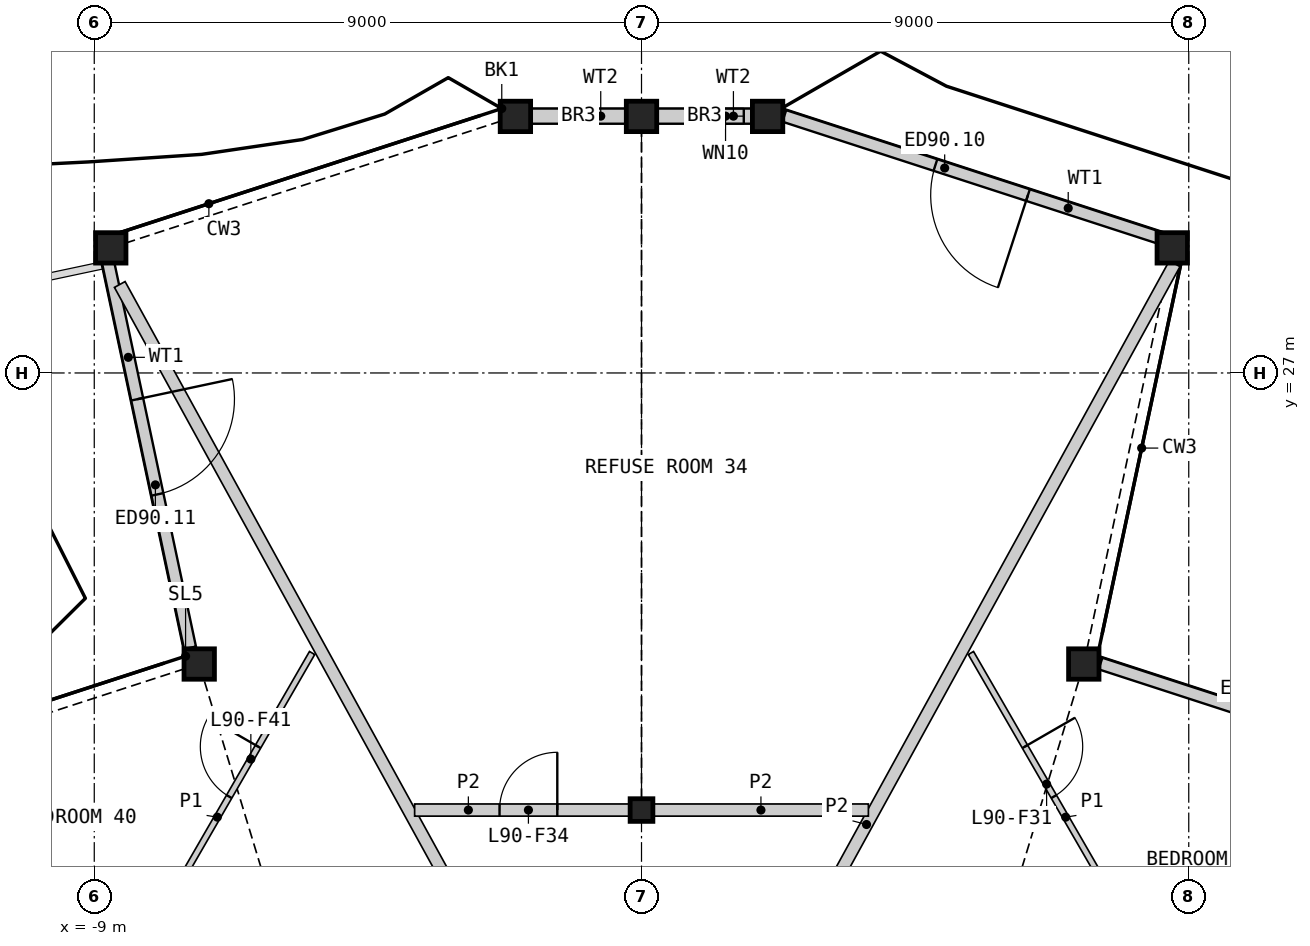
"""IFC4 building model, lengths in metres.
Left out: names, types, materials, properties, quantities, classifications, styles, units other than length and angle.
Written with IfcOpenShell. Run it as: python <this file> out.ifc"""

import sys

from ifc_helpers import new_model, si_unit, direction, frame, frame_2d, origin, origin_2d, place, context, subcontext, project, spatial, rectangle, hollow_rectangle, i_section, extrude, element, fill, save


model = new_model("IFC4")
c1 = context("Model", 3, precision=1e-05, world=origin(), true_north=direction((0.0, 1.0)))
c2 = subcontext(c1, "Body", "Model", "MODEL_VIEW")
j1 = project(units=[si_unit("LENGTHUNIT", "METRE"), si_unit("PLANEANGLEUNIT", "RADIAN")], contexts=[c1])
p1 = place(None, origin())
s1 = spatial("IfcSite", under=j1, at=p1, CompositionType="ELEMENT")
p2 = place(p1, origin())
s2 = spatial("IfcBuilding", under=s1, at=p2, CompositionType="ELEMENT")
p3 = place(p2, frame((0.0, 0.0, 395.0)))
s3 = spatial("IfcBuildingStorey", under=s2, at=p3, CompositionType="ELEMENT", Elevation=395.0)
for number, where, z_axis, x_axis in (
    (1, (7.274, 22.213, 0.0), (0.0, 0.0, 1.0), (1.0, 0.0, 0.0)),
    (2, (8.729, 29.057, 0.0), (0.0, 0.0, 1.0), (1.0, 0.0, 0.0)),
    (3, (2.074, 31.219, 0.0), (0.0, 0.0, 1.0), (1.0, 0.0, 0.0)),
    (4, (0.0, 31.219, 0.0), (0.0, 0.0, 1.0), (1.0, 0.0, 0.0)),
    (5, (-2.074, 31.219, 0.0), (0.0, 0.0, 1.0), (1.0, 0.0, 0.0)),
    (6, (-8.729, 29.057, 0.0), (0.0, 0.0, 1.0), (1.0, 0.0, 0.0)),
    (7, (-7.274, 22.213, 0.0), (0.0, 0.0, 1.0), (1.0, 0.0, 0.0)),
):
    element("IfcColumn", number, at=place(p3, frame(where, z_axis=z_axis, x_axis=x_axis)), inside=s3, PredefinedType="COLUMN", context=c2, shape_type="SweptSolid", body=[
        extrude(hollow_rectangle(XDim=0.5, YDim=0.5, WallThickness=0.03, at=origin_2d()), origin(), (0.0, 0.0, 1.0), 3.4),
    ])
p4 = place(p3, frame((0.0, 19.811, 0.0), z_axis=(0.0, 0.0, 1.0), x_axis=(1.0, 0.0, 0.0)))
e8 = element("IfcColumn", 8, at=p4, inside=s3, PredefinedType="COLUMN", context=c2, shape_type="SweptSolid", body=[
    extrude(i_section(OverallWidth=0.374, OverallDepth=0.372, WebThickness=0.016, FlangeThickness=0.026, at=origin_2d()), origin(), (0.0, 0.0, 1.0), 3.4),
])
p5 = place(p3, frame((13.774, 20.198, 0.0), z_axis=(0.0, 0.0, 1.0), x_axis=(-0.951046950169, 0.309046434335, 0.0)))
e9 = element("IfcWall", 9, at=p5, inside=s3, PredefinedType="SOLIDWALL", context=c2, shape_type="SweptSolid", body=[
    extrude(rectangle(XDim=6.546, YDim=0.2, at=frame_2d((3.273, 0.0))), origin(), (0.0, 0.0, 1.0), 2.634),
])
p6 = place(p5, frame((2.333, 0.0, 0.0)))
e10 = element("IfcOpeningElement", 10, at=p6, cuts=e9, PredefinedType="OPENING", context=c2, shape_type="SweptSolid", body=[
    extrude(rectangle(XDim=1.6, YDim=2.25, at=frame_2d((0.8, 1.125))), frame((0.0, 0.11, 0.0), z_axis=(0.0, -1.0, 0.0), x_axis=(1.0, 0.0, 0.0)), (0.0, 0.0, 1.0), 0.22),
])
p7 = place(p3, frame((8.574, 29.205, 0.0), z_axis=(0.0, 0.0, 1.0), x_axis=(-0.951057912068, 0.309012698595, 0.0)))
e11 = element("IfcWall", 11, at=p7, inside=s3, PredefinedType="SOLIDWALL", context=c2, shape_type="SweptSolid", body=[
    extrude(rectangle(XDim=6.546, YDim=0.2, at=frame_2d((3.273, 0.0))), origin(), (0.0, 0.0, 1.0), 2.634),
])
p8 = place(p7, frame((2.333, 0.0, 0.0)))
e12 = element("IfcOpeningElement", 12, at=p8, cuts=e11, PredefinedType="OPENING", context=c2, shape_type="SweptSolid", body=[
    extrude(rectangle(XDim=1.6, YDim=2.25, at=frame_2d((0.8, 1.125))), frame((0.0, 0.11, 0.0), z_axis=(0.0, -1.0, 0.0), x_axis=(1.0, 0.0, 0.0)), (0.0, 0.0, 1.0), 0.22),
])
p9 = place(p3, frame((1.932, 31.224, 0.0), z_axis=(0.0, 0.0, 1.0), x_axis=(-1.0, 0.0, 0.0)))
e13 = element("IfcWall", 13, at=p9, inside=s3, PredefinedType="SOLIDWALL", context=c2, shape_type="SweptSolid", body=[
    extrude(rectangle(XDim=1.682, YDim=0.25, at=frame_2d((0.841, 0.0))), origin(), (0.0, 0.0, 1.0), 2.634),
])
p10 = place(p9, frame((0.25, 0.0, 0.4)))
e14 = element("IfcOpeningElement", 14, at=p10, cuts=e13, PredefinedType="OPENING", context=c2, shape_type="SweptSolid", body=[
    extrude(rectangle(XDim=0.6, YDim=0.6, at=frame_2d((0.3, 0.3))), frame((0.0, 0.135, 0.0), z_axis=(0.0, -1.0, 0.0), x_axis=(1.0, 0.0, 0.0)), (0.0, 0.0, 1.0), 0.27),
])
p11 = place(p3, frame((-0.25, 31.224, 0.0), z_axis=(0.0, 0.0, 1.0), x_axis=(-1.0, 0.0, 0.0)))
e15 = element("IfcWall", 15, at=p11, inside=s3, PredefinedType="SOLIDWALL", context=c2, shape_type="SweptSolid", body=[
    extrude(rectangle(XDim=1.682, YDim=0.25, at=frame_2d((0.841, 0.0))), origin(), (0.0, 0.0, 1.0), 2.634),
])
p12 = place(p3, frame((-8.779, 28.85, 0.0), z_axis=(0.0, 0.0, 1.0), x_axis=(0.207910765171, -0.978147797486, 0.0)))
e16 = element("IfcWall", 16, at=p12, inside=s3, PredefinedType="SOLIDWALL", context=c2, shape_type="SweptSolid", body=[
    extrude(rectangle(XDim=6.512, YDim=0.2, at=frame_2d((3.256, 0.0))), origin(), (0.0, 0.0, 1.0), 2.634),
])
p13 = place(p12, frame((2.333, 0.0, 0.0)))
e17 = element("IfcOpeningElement", 17, at=p13, cuts=e16, PredefinedType="OPENING", context=c2, shape_type="SweptSolid", body=[
    extrude(rectangle(XDim=1.6, YDim=2.25, at=frame_2d((0.8, 1.125))), frame((0.0, 0.11, 0.0), z_axis=(0.0, -1.0, 0.0), x_axis=(1.0, 0.0, 0.0)), (0.0, 0.0, 1.0), 0.22),
])
p14 = place(p3, frame((-8.581, 28.455, 0.0), z_axis=(0.0, 0.0, 1.0), x_axis=(0.481551865547, -0.876417594979, 0.0)))
e18 = element("IfcWall", 18, at=p14, inside=s3, PredefinedType="PARTITIONING", context=c2, shape_type="SweptSolid", body=[
    extrude(rectangle(XDim=13.643, YDim=0.2, at=frame_2d((6.821, 0.0))), origin(), (0.0, 0.0, 1.0), 2.33),
])
p15 = place(p3, frame((2.011, 16.499, 0.0), z_axis=(0.0, 0.0, 1.0), x_axis=(0.481548701843, 0.876419333284, 0.0)))
e19 = element("IfcWall", 19, at=p15, inside=s3, PredefinedType="PARTITIONING", context=c2, shape_type="SweptSolid", body=[
    extrude(rectangle(XDim=14.032, YDim=0.2, at=frame_2d((7.016, 0.0))), origin(), (0.0, 0.0, 1.0), 2.33),
])
p16 = place(p3, frame((0.197, 19.811, 0.0), z_axis=(0.0, 0.0, 1.0), x_axis=(1.0, 0.0, 0.0)))
e20 = element("IfcWall", 20, at=p16, inside=s3, PredefinedType="PARTITIONING", context=c2, shape_type="SweptSolid", body=[
    extrude(rectangle(XDim=3.534, YDim=0.2, at=frame_2d((1.767, 0.0))), origin(), (0.0, 0.0, 1.0), 2.33),
])
p17 = place(p3, frame((-3.731, 19.811, 0.0), z_axis=(0.0, 0.0, 1.0), x_axis=(1.0, 0.0, 0.0)))
e21 = element("IfcWall", 21, at=p17, inside=s3, PredefinedType="PARTITIONING", context=c2, shape_type="SweptSolid", body=[
    extrude(rectangle(XDim=3.534, YDim=0.2, at=frame_2d((1.767, 0.0))), origin(), (0.0, 0.0, 1.0), 2.33),
])
p18 = place(p17, frame((1.396, 0.0, 0.0)))
e22 = element("IfcOpeningElement", 22, at=p18, cuts=e21, PredefinedType="OPENING", context=c2, shape_type="SweptSolid", body=[
    extrude(rectangle(XDim=0.95, YDim=2.1, at=frame_2d((0.475, 1.05))), frame((0.0, 0.11, 0.0), z_axis=(0.0, -1.0, 0.0), x_axis=(1.0, 0.0, 0.0)), (0.0, 0.0, 1.0), 0.22),
])
p19 = place(p3, frame((-13.669, 19.9, 0.0), z_axis=(0.0, 0.0, 1.0), x_axis=(0.866032376801, -0.499987922186, 0.0)))
e23 = element("IfcWall", 23, at=p19, inside=s3, PredefinedType="PARTITIONING", context=c2, shape_type="SweptSolid", body=[
    extrude(rectangle(XDim=11.782, YDim=0.1, at=frame_2d((5.891, 0.0))), origin(), (0.0, 0.0, 1.0), 2.33),
])
p20 = place(p19, frame((4.664, 0.0, 0.0)))
e24 = element("IfcOpeningElement", 24, at=p20, cuts=e23, PredefinedType="OPENING", context=c2, shape_type="SweptSolid", body=[
    extrude(rectangle(XDim=0.95, YDim=2.1, at=frame_2d((0.475, 1.05))), frame((0.0, 0.06, 0.0), z_axis=(0.0, -1.0, 0.0), x_axis=(1.0, 0.0, 0.0)), (0.0, 0.0, 1.0), 0.12),
])
p21 = place(p3, frame((3.465, 14.01, 0.0), z_axis=(0.0, 0.0, 1.0), x_axis=(0.866032376801, 0.499987922186, 0.0)))
e25 = element("IfcWall", 25, at=p21, inside=s3, PredefinedType="PARTITIONING", context=c2, shape_type="SweptSolid", body=[
    extrude(rectangle(XDim=11.782, YDim=0.1, at=frame_2d((5.891, 0.0))), origin(), (0.0, 0.0, 1.0), 2.33),
])
p22 = place(p21, frame((6.168, 0.0, 0.0)))
e26 = element("IfcOpeningElement", 26, at=p22, cuts=e25, PredefinedType="OPENING", context=c2, shape_type="SweptSolid", body=[
    extrude(rectangle(XDim=0.95, YDim=2.1, at=frame_2d((0.475, 1.05))), frame((0.0, 0.06, 0.0), z_axis=(0.0, -1.0, 0.0), x_axis=(1.0, 0.0, 0.0)), (0.0, 0.0, 1.0), 0.12),
])
p23 = place(p3, frame((5.417, 22.394, 0.0), z_axis=(0.0, 0.0, 1.0), x_axis=(0.499975529996, -0.866039531087, 0.0)))
e27 = element("IfcWall", 27, at=p23, inside=s3, PredefinedType="PARTITIONING", context=c2, shape_type="SweptSolid", body=[
    extrude(rectangle(XDim=6.235, YDim=0.1, at=frame_2d((3.118, 0.0))), origin(), (0.0, 0.0, 1.0), 2.33),
])
p24 = place(p23, frame((1.777, 0.0, 0.0)))
e28 = element("IfcOpeningElement", 28, at=p24, cuts=e27, PredefinedType="OPENING", context=c2, shape_type="SweptSolid", body=[
    extrude(rectangle(XDim=0.95, YDim=2.1, at=frame_2d((0.475, 1.05))), frame((0.0, 0.06, 0.0), z_axis=(0.0, -1.0, 0.0), x_axis=(1.0, 0.0, 0.0)), (0.0, 0.0, 1.0), 0.12),
])
p25 = place(p3, frame((-8.535, 16.994, 0.0), z_axis=(0.0, 0.0, 1.0), x_axis=(0.499975529996, 0.866039531087, 0.0)))
e29 = element("IfcWall", 29, at=p25, inside=s3, PredefinedType="PARTITIONING", context=c2, shape_type="SweptSolid", body=[
    extrude(rectangle(XDim=6.235, YDim=0.1, at=frame_2d((3.118, 0.0))), origin(), (0.0, 0.0, 1.0), 2.33),
])
p26 = place(p25, frame((3.508, 0.0, 0.0)))
e30 = element("IfcOpeningElement", 30, at=p26, cuts=e29, PredefinedType="OPENING", context=c2, shape_type="SweptSolid", body=[
    extrude(rectangle(XDim=0.95, YDim=2.1, at=frame_2d((0.475, 1.05))), frame((0.0, 0.06, 0.0), z_axis=(0.0, -1.0, 0.0), x_axis=(1.0, 0.0, 0.0)), (0.0, 0.0, 1.0), 0.12),
])
p27 = place(p8, origin())
e31 = element("IfcDoor", 31, at=p27, inside=s3, OperationType="DOUBLE_DOOR_SINGLE_SWING", PredefinedType="DOOR", context=c2, shape_type="SweptSolid", body=[
    extrude(rectangle(XDim=1.6, YDim=2.25, at=frame_2d((0.8, 1.125))), frame((0.0, 0.025, 0.0), z_axis=(0.0, -1.0, 0.0), x_axis=(1.0, 0.0, 0.0)), (0.0, 0.0, 1.0), 0.05),
])
fill(e12, e31)
p28 = place(p10, origin())
e32 = element("IfcWindow", 32, at=p28, inside=s3, PartitioningType="SINGLE_PANEL", PredefinedType="WINDOW", context=c2, shape_type="SweptSolid", body=[
    extrude(rectangle(XDim=0.6, YDim=0.6, at=frame_2d((0.3, 0.3))), frame((0.0, 0.03, 0.0), z_axis=(0.0, -1.0, 0.0), x_axis=(1.0, 0.0, 0.0)), (0.0, 0.0, 1.0), 0.06),
])
fill(e14, e32)
p29 = place(p13, origin())
e33 = element("IfcDoor", 33, at=p29, inside=s3, OperationType="DOUBLE_DOOR_SINGLE_SWING", PredefinedType="DOOR", context=c2, shape_type="SweptSolid", body=[
    extrude(rectangle(XDim=1.6, YDim=2.25, at=frame_2d((0.8, 1.125))), frame((0.0, 0.025, 0.0), z_axis=(0.0, -1.0, 0.0), x_axis=(1.0, 0.0, 0.0)), (0.0, 0.0, 1.0), 0.05),
])
fill(e17, e33)
p30 = place(p24, origin())
e34 = element("IfcDoor", 34, at=p30, inside=s3, OperationType="SINGLE_SWING_LEFT", PredefinedType="DOOR", context=c2, shape_type="SweptSolid", body=[
    extrude(rectangle(XDim=0.95, YDim=2.1, at=frame_2d((0.475, 1.05))), frame((0.0, 0.025, 0.0), z_axis=(0.0, -1.0, 0.0), x_axis=(1.0, 0.0, 0.0)), (0.0, 0.0, 1.0), 0.05),
])
fill(e28, e34)
p31 = place(p18, origin())
e35 = element("IfcDoor", 35, at=p31, inside=s3, OperationType="SINGLE_SWING_RIGHT", PredefinedType="DOOR", context=c2, shape_type="SweptSolid", body=[
    extrude(rectangle(XDim=0.95, YDim=2.1, at=frame_2d((0.475, 1.05))), frame((0.0, 0.025, 0.0), z_axis=(0.0, -1.0, 0.0), x_axis=(1.0, 0.0, 0.0)), (0.0, 0.0, 1.0), 0.05),
])
fill(e22, e35)
p32 = place(p26, origin())
e36 = element("IfcDoor", 36, at=p32, inside=s3, OperationType="SINGLE_SWING_RIGHT", PredefinedType="DOOR", context=c2, shape_type="SweptSolid", body=[
    extrude(rectangle(XDim=0.95, YDim=2.1, at=frame_2d((0.475, 1.05))), frame((0.0, 0.025, 0.0), z_axis=(0.0, -1.0, 0.0), x_axis=(1.0, 0.0, 0.0)), (0.0, 0.0, 1.0), 0.05),
])
fill(e30, e36)
save(model, sys.argv[1])
